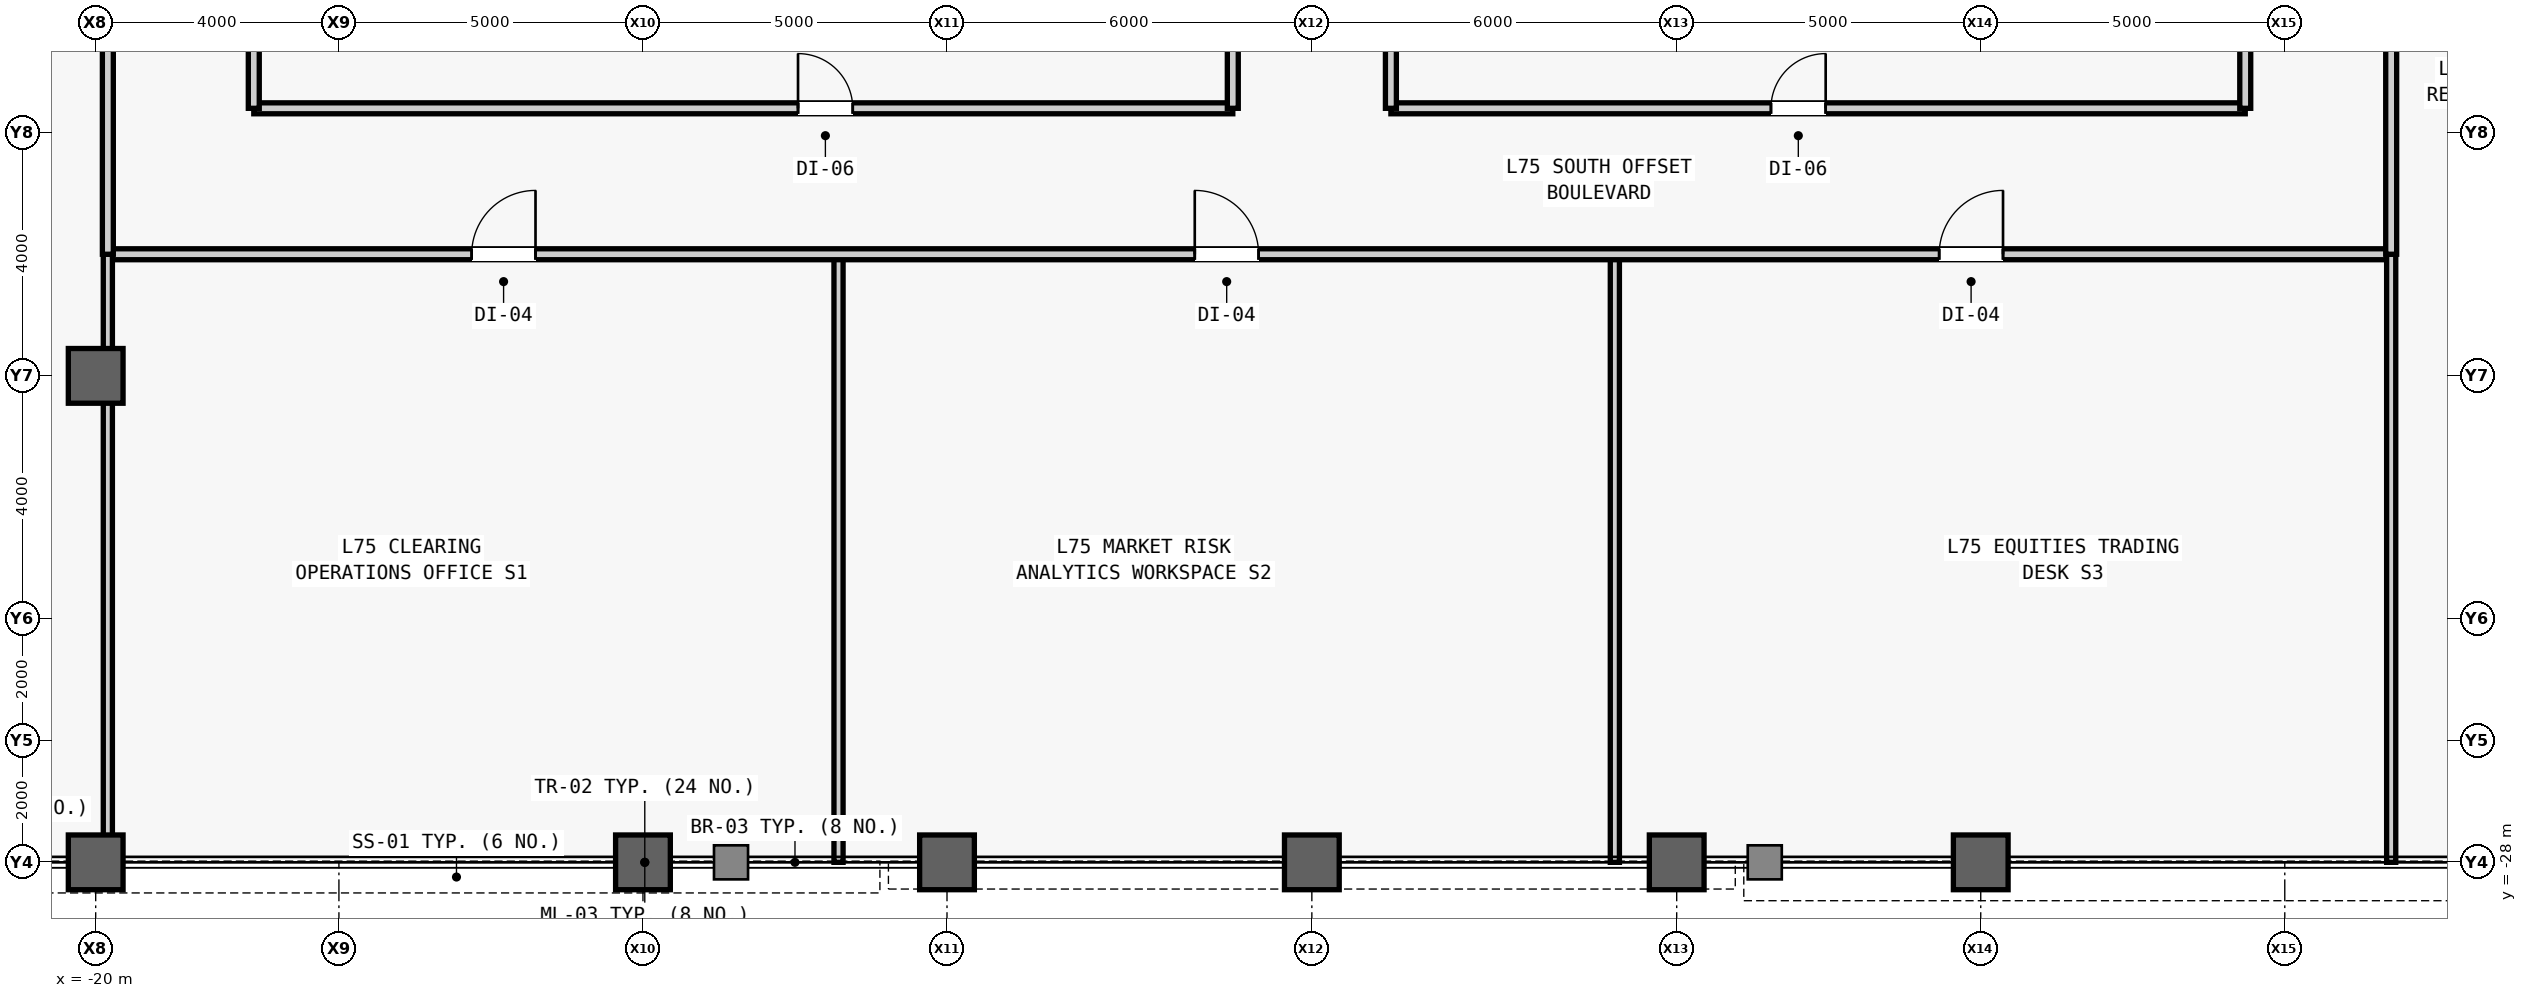
"""IFC4 building model, lengths in metres.
Left out: names, types, materials, properties, quantities, classifications, styles, units other than length and angle.
Written with IfcOpenShell. Run it as: python <this file> out.ifc"""

import sys

from ifc_helpers import new_model, si_unit, direction, frame, frame_2d, origin, origin_2d, place, context, subcontext, project, spatial, rectangle, hollow_rectangle, extrude, source, transform, mapped, element, fill, save


model = new_model("IFC4")
c1 = context("Model", 3, precision=1e-05, world=origin(), true_north=direction((0.0, 1.0)))
c2 = subcontext(c1, "Body", "Model", "MODEL_VIEW")
j1 = project(units=[si_unit("LENGTHUNIT", "METRE"), si_unit("PLANEANGLEUNIT", "RADIAN")], contexts=[c1])
p1 = place(None, origin())
s1 = spatial("IfcSite", under=j1, at=p1, CompositionType="ELEMENT")
p2 = place(p1, origin())
s2 = spatial("IfcBuilding", under=s1, at=p2, CompositionType="ELEMENT")
p3 = place(p2, frame((0.0, 0.0, 317.5)))
s3 = spatial("IfcBuildingStorey", under=s2, at=p3, CompositionType="ELEMENT", Elevation=317.5)
m1 = source(origin(), c2, "Body", "SweptSolid", [
    extrude(hollow_rectangle(XDim=0.9, YDim=0.9, WallThickness=0.05, at=origin_2d()), origin(), (0.0, 0.0, 1.0), 4.0),
])
for number, where, z_axis, x_axis in (
    (1, (-20.0, -28.0, 0.0), (0.0, 0.0, 1.0), (1.0, 0.0, 0.0)),
    (2, (-20.0, -20.0, 0.0), (0.0, 0.0, 1.0), (1.0, 0.0, 0.0)),
    (3, (-11.0, -28.0, 0.0), (0.0, 0.0, 1.0), (1.0, 0.0, 0.0)),
    (4, (-6.0, -28.0, 0.0), (0.0, 0.0, 1.0), (1.0, 0.0, 0.0)),
    (5, (0.0, -28.0, 0.0), (0.0, 0.0, 1.0), (1.0, 0.0, 0.0)),
    (6, (6.0, -28.0, 0.0), (0.0, 0.0, 1.0), (1.0, 0.0, 0.0)),
    (7, (11.0, -28.0, 0.0), (0.0, 0.0, 1.0), (1.0, 0.0, 0.0)),
):
    element("IfcColumn", number, at=place(p3, frame(where, z_axis=z_axis, x_axis=x_axis)), inside=s3, PredefinedType="COLUMN", context=c2, shape_type="MappedRepresentation", body=[
        mapped(m1, transform((0.0, 0.0, 0.0), scale=1.0)),
    ])
m2 = source(origin(), c2, "Body", "SweptSolid", [
    extrude(rectangle(XDim=16.1, YDim=0.18, at=frame_2d((8.05, 0.0))), origin(), (0.0, 0.0, 1.0), 3.78),
])
p4 = place(p3, frame((-17.4, -15.6, 0.0), z_axis=(0.0, 0.0, 1.0), x_axis=(1.0, 0.0, 0.0)))
e8 = element("IfcWall", 8, at=p4, inside=s3, PredefinedType="PARTITIONING", context=c2, shape_type="MappedRepresentation", body=[
    mapped(m2, transform((0.0, 0.0, 0.0), scale=1.0)),
])
m3 = source(origin(), c2, "Body", "SweptSolid", [
    extrude(rectangle(XDim=0.9, YDim=2.15, at=frame_2d((0.45, 1.075))), frame((0.0, 0.1, 0.0), z_axis=(0.0, -1.0, 0.0), x_axis=(1.0, 0.0, 0.0)), (0.0, 0.0, 1.0), 0.2),
])
p5 = place(p4, frame((8.95, 0.0, 0.0)))
e9 = element("IfcOpeningElement", 9, at=p5, cuts=e8, PredefinedType="OPENING", context=c2, shape_type="MappedRepresentation", body=[
    mapped(m3, transform((0.0, 0.0, 0.0), scale=1.0)),
])
m4 = source(origin(), c2, "Body", "SweptSolid", [
    extrude(rectangle(XDim=5.8, YDim=0.18, at=frame_2d((2.9, 0.0))), origin(), (0.0, 0.0, 1.0), 3.78),
])
p6 = place(p3, frame((-17.4, -15.6, 0.0), z_axis=(0.0, 0.0, 1.0), x_axis=(0.0, 1.0, 0.0)))
e10 = element("IfcWall", 10, at=p6, inside=s3, PredefinedType="PARTITIONING", context=c2, shape_type="MappedRepresentation", body=[
    mapped(m4, transform((0.0, 0.0, 0.0), scale=1.0)),
])
m5 = source(origin(), c2, "Body", "SweptSolid", [
    extrude(rectangle(XDim=4.6, YDim=0.18, at=frame_2d((2.3, 0.0))), origin(), (0.0, 0.0, 1.0), 3.78),
])
p7 = place(p3, frame((-1.3, -15.6, 0.0), z_axis=(0.0, 0.0, 1.0), x_axis=(0.0, 1.0, 0.0)))
e11 = element("IfcWall", 11, at=p7, inside=s3, PredefinedType="PARTITIONING", context=c2, shape_type="MappedRepresentation", body=[
    mapped(m5, transform((0.0, 0.0, 0.0), scale=1.0)),
])
m6 = source(origin(), c2, "Body", "SweptSolid", [
    extrude(rectangle(XDim=14.05, YDim=0.18, at=frame_2d((7.025, 0.0))), origin(), (0.0, 0.0, 1.0), 3.78),
])
p8 = place(p3, frame((1.3, -15.6, 0.0), z_axis=(0.0, 0.0, 1.0), x_axis=(1.0, 0.0, 0.0)))
e12 = element("IfcWall", 12, at=p8, inside=s3, PredefinedType="PARTITIONING", context=c2, shape_type="MappedRepresentation", body=[
    mapped(m6, transform((0.0, 0.0, 0.0), scale=1.0)),
])
p9 = place(p8, frame((6.25, 0.0, 0.0)))
e13 = element("IfcOpeningElement", 13, at=p9, cuts=e12, PredefinedType="OPENING", context=c2, shape_type="MappedRepresentation", body=[
    mapped(m3, transform((0.0, 0.0, 0.0), scale=1.0)),
])
p10 = place(p3, frame((1.3, -15.6, 0.0), z_axis=(0.0, 0.0, 1.0), x_axis=(0.0, 1.0, 0.0)))
e14 = element("IfcWall", 14, at=p10, inside=s3, PredefinedType="PARTITIONING", context=c2, shape_type="MappedRepresentation", body=[
    mapped(m5, transform((0.0, 0.0, 0.0), scale=1.0)),
])
m7 = source(origin(), c2, "Body", "SweptSolid", [
    extrude(rectangle(XDim=5.1, YDim=0.18, at=frame_2d((2.55, 0.0))), origin(), (0.0, 0.0, 1.0), 3.78),
])
p11 = place(p3, frame((15.35, -15.6, 0.0), z_axis=(0.0, 0.0, 1.0), x_axis=(0.0, 1.0, 0.0)))
e15 = element("IfcWall", 15, at=p11, inside=s3, PredefinedType="PARTITIONING", context=c2, shape_type="MappedRepresentation", body=[
    mapped(m7, transform((0.0, 0.0, 0.0), scale=1.0)),
])
m8 = source(origin(), c2, "Body", "SweptSolid", [
    extrude(rectangle(XDim=10.0, YDim=0.15, at=frame_2d((5.0, 0.0))), origin(), (0.0, 0.0, 1.0), 3.78),
])
for number, where, z_axis, x_axis in (
    (16, (-7.784, -28.0, 0.0), (0.0, 0.0, 1.0), (0.0, 1.0, 0.0)),
    (17, (4.983, -28.0, 0.0), (0.0, 0.0, 1.0), (0.0, 1.0, 0.0)),
):
    element("IfcWall", number, at=place(p3, frame(where, z_axis=z_axis, x_axis=x_axis)), inside=s3, PredefinedType="PARTITIONING", context=c2, shape_type="MappedRepresentation", body=[
        mapped(m8, transform((0.0, 0.0, 0.0), scale=1.0)),
    ])
m9 = source(origin(), c2, "Body", "SweptSolid", [
    extrude(rectangle(XDim=37.55, YDim=0.18, at=frame_2d((18.775, 0.0))), origin(), (0.0, 0.0, 1.0), 3.78),
])
p12 = place(p3, frame((-19.8, -18.0, 0.0), z_axis=(0.0, 0.0, 1.0), x_axis=(1.0, 0.0, 0.0)))
e18 = element("IfcWall", 18, at=p12, inside=s3, PredefinedType="PARTITIONING", context=c2, shape_type="MappedRepresentation", body=[
    mapped(m9, transform((0.0, 0.0, 0.0), scale=1.0)),
])
m10 = source(origin(), c2, "Body", "SweptSolid", [
    extrude(rectangle(XDim=1.05, YDim=2.2, at=frame_2d((0.525, 1.1))), frame((0.0, 0.1, 0.0), z_axis=(0.0, -1.0, 0.0), x_axis=(1.0, 0.0, 0.0)), (0.0, 0.0, 1.0), 0.2),
])
p13 = place(p12, frame((5.983, 0.0, 0.0)))
e19 = element("IfcOpeningElement", 19, at=p13, cuts=e18, PredefinedType="OPENING", context=c2, shape_type="MappedRepresentation", body=[
    mapped(m10, transform((0.0, 0.0, 0.0), scale=1.0)),
])
p14 = place(p12, frame((17.875, 0.0, 0.0)))
e20 = element("IfcOpeningElement", 20, at=p14, cuts=e18, PredefinedType="OPENING", context=c2, shape_type="MappedRepresentation", body=[
    mapped(m10, transform((0.0, 0.0, 0.0), scale=1.0)),
])
p15 = place(p12, frame((30.116, 0.0, 0.0)))
e21 = element("IfcOpeningElement", 21, at=p15, cuts=e18, PredefinedType="OPENING", context=c2, shape_type="MappedRepresentation", body=[
    mapped(m10, transform((0.0, 0.0, 0.0), scale=1.0)),
])
m11 = source(origin(), c2, "Body", "SweptSolid", [
    extrude(rectangle(XDim=10.0, YDim=0.15, at=frame_2d((5.0, 0.0))), origin(), (0.0, 0.0, 1.0), 3.164),
])
p16 = place(p3, frame((-19.8, -28.0, 0.0), z_axis=(0.0, 0.0, 1.0), x_axis=(0.0, 1.0, 0.0)))
e22 = element("IfcWall", 22, at=p16, inside=s3, PredefinedType="PARTITIONING", context=c2, shape_type="MappedRepresentation", body=[
    mapped(m11, transform((0.0, 0.0, 0.0), scale=1.0)),
])
p17 = place(p3, frame((17.75, -28.0, 0.0), z_axis=(0.0, 0.0, 1.0), x_axis=(0.0, 1.0, 0.0)))
e23 = element("IfcWall", 23, at=p17, inside=s3, PredefinedType="PARTITIONING", context=c2, shape_type="MappedRepresentation", body=[
    mapped(m8, transform((0.0, 0.0, 0.0), scale=1.0)),
])
m12 = source(origin(), c2, "Body", "SweptSolid", [
    extrude(rectangle(XDim=40.5, YDim=0.18, at=frame_2d((20.25, 0.0))), origin(), (0.0, 0.0, 1.0), 3.164),
])
p18 = place(p3, frame((-19.8, -18.0, 0.0), z_axis=(0.0, 0.0, 1.0), x_axis=(0.0, 1.0, 0.0)))
e24 = element("IfcWall", 24, at=p18, inside=s3, PredefinedType="PARTITIONING", context=c2, shape_type="MappedRepresentation", body=[
    mapped(m12, transform((0.0, 0.0, 0.0), scale=1.0)),
])
m13 = source(origin(), c2, "Body", "SweptSolid", [
    extrude(rectangle(XDim=0.95, YDim=2.15, at=frame_2d((0.475, 1.075))), frame((0.0, 0.1, 0.0), z_axis=(0.0, -1.0, 0.0), x_axis=(1.0, 0.0, 0.0)), (0.0, 0.0, 1.0), 0.2),
])
p19 = place(p18, frame((5.657, 0.0, 0.0)))
e25 = element("IfcOpeningElement", 25, at=p19, cuts=e24, PredefinedType="OPENING", context=c2, shape_type="MappedRepresentation", body=[
    mapped(m13, transform((0.0, 0.0, 0.0), scale=1.0)),
])
p20 = place(p18, frame((13.157, 0.0, 0.0)))
e26 = element("IfcOpeningElement", 26, at=p20, cuts=e24, PredefinedType="OPENING", context=c2, shape_type="MappedRepresentation", body=[
    mapped(m13, transform((0.0, 0.0, 0.0), scale=1.0)),
])
p21 = place(p18, frame((21.893, 0.0, 0.0)))
e27 = element("IfcOpeningElement", 27, at=p21, cuts=e24, PredefinedType="OPENING", context=c2, shape_type="MappedRepresentation", body=[
    mapped(m13, transform((0.0, 0.0, 0.0), scale=1.0)),
])
p22 = place(p18, frame((29.393, 0.0, 0.0)))
e28 = element("IfcOpeningElement", 28, at=p22, cuts=e24, PredefinedType="OPENING", context=c2, shape_type="MappedRepresentation", body=[
    mapped(m13, transform((0.0, 0.0, 0.0), scale=1.0)),
])
m14 = source(origin(), c2, "Body", "SweptSolid", [
    extrude(rectangle(XDim=40.5, YDim=0.18, at=frame_2d((20.25, 0.0))), origin(), (0.0, 0.0, 1.0), 3.78),
])
p23 = place(p3, frame((17.75, -18.0, 0.0), z_axis=(0.0, 0.0, 1.0), x_axis=(0.0, 1.0, 0.0)))
e29 = element("IfcWall", 29, at=p23, inside=s3, PredefinedType="PARTITIONING", context=c2, shape_type="MappedRepresentation", body=[
    mapped(m14, transform((0.0, 0.0, 0.0), scale=1.0)),
])
p24 = place(p23, frame((6.021, 0.0, 0.0)))
e30 = element("IfcOpeningElement", 30, at=p24, cuts=e29, PredefinedType="OPENING", context=c2, shape_type="MappedRepresentation", body=[
    mapped(m13, transform((0.0, 0.0, 0.0), scale=1.0)),
])
p25 = place(p23, frame((14.481, 0.0, 0.0)))
e31 = element("IfcOpeningElement", 31, at=p25, cuts=e29, PredefinedType="OPENING", context=c2, shape_type="MappedRepresentation", body=[
    mapped(m13, transform((0.0, 0.0, 0.0), scale=1.0)),
])
p26 = place(p23, frame((24.985, 0.0, 0.0)))
e32 = element("IfcOpeningElement", 32, at=p26, cuts=e29, PredefinedType="OPENING", context=c2, shape_type="MappedRepresentation", body=[
    mapped(m13, transform((0.0, 0.0, 0.0), scale=1.0)),
])
m15 = source(origin(), c2, "Body", "SweptSolid", [
    extrude(rectangle(XDim=0.9, YDim=2.15, at=frame_2d((0.45, 1.075))), frame((0.0, 0.025, 0.0), z_axis=(0.0, -1.0, 0.0), x_axis=(1.0, 0.0, 0.0)), (0.0, 0.0, 1.0), 0.05),
])
p27 = place(p5, origin())
e33 = element("IfcDoor", 33, at=p27, inside=s3, OperationType="SINGLE_SWING_LEFT", PredefinedType="DOOR", context=c2, shape_type="MappedRepresentation", body=[
    mapped(m15, transform((0.0, 0.0, 0.0), scale=1.0)),
])
fill(e9, e33)
p28 = place(p9, origin())
e34 = element("IfcDoor", 34, at=p28, inside=s3, OperationType="SINGLE_SWING_RIGHT", PredefinedType="DOOR", context=c2, shape_type="MappedRepresentation", body=[
    mapped(m15, transform((0.0, 0.0, 0.0), scale=1.0)),
])
fill(e13, e34)
m16 = source(origin(), c2, "Body", "SweptSolid", [
    extrude(rectangle(XDim=1.05, YDim=2.2, at=frame_2d((0.525, 1.1))), frame((0.0, 0.025, 0.0), z_axis=(0.0, -1.0, 0.0), x_axis=(1.0, 0.0, 0.0)), (0.0, 0.0, 1.0), 0.05),
])
p29 = place(p13, origin())
e35 = element("IfcDoor", 35, at=p29, inside=s3, OperationType="SINGLE_SWING_RIGHT", PredefinedType="DOOR", context=c2, shape_type="MappedRepresentation", body=[
    mapped(m16, transform((0.0, 0.0, 0.0), scale=1.0)),
])
fill(e19, e35)
p30 = place(p14, origin())
e36 = element("IfcDoor", 36, at=p30, inside=s3, OperationType="SINGLE_SWING_LEFT", PredefinedType="DOOR", context=c2, shape_type="MappedRepresentation", body=[
    mapped(m16, transform((0.0, 0.0, 0.0), scale=1.0)),
])
fill(e20, e36)
p31 = place(p15, origin())
e37 = element("IfcDoor", 37, at=p31, inside=s3, OperationType="SINGLE_SWING_RIGHT", PredefinedType="DOOR", context=c2, shape_type="MappedRepresentation", body=[
    mapped(m16, transform((0.0, 0.0, 0.0), scale=1.0)),
])
fill(e21, e37)
save(model, sys.argv[1])
